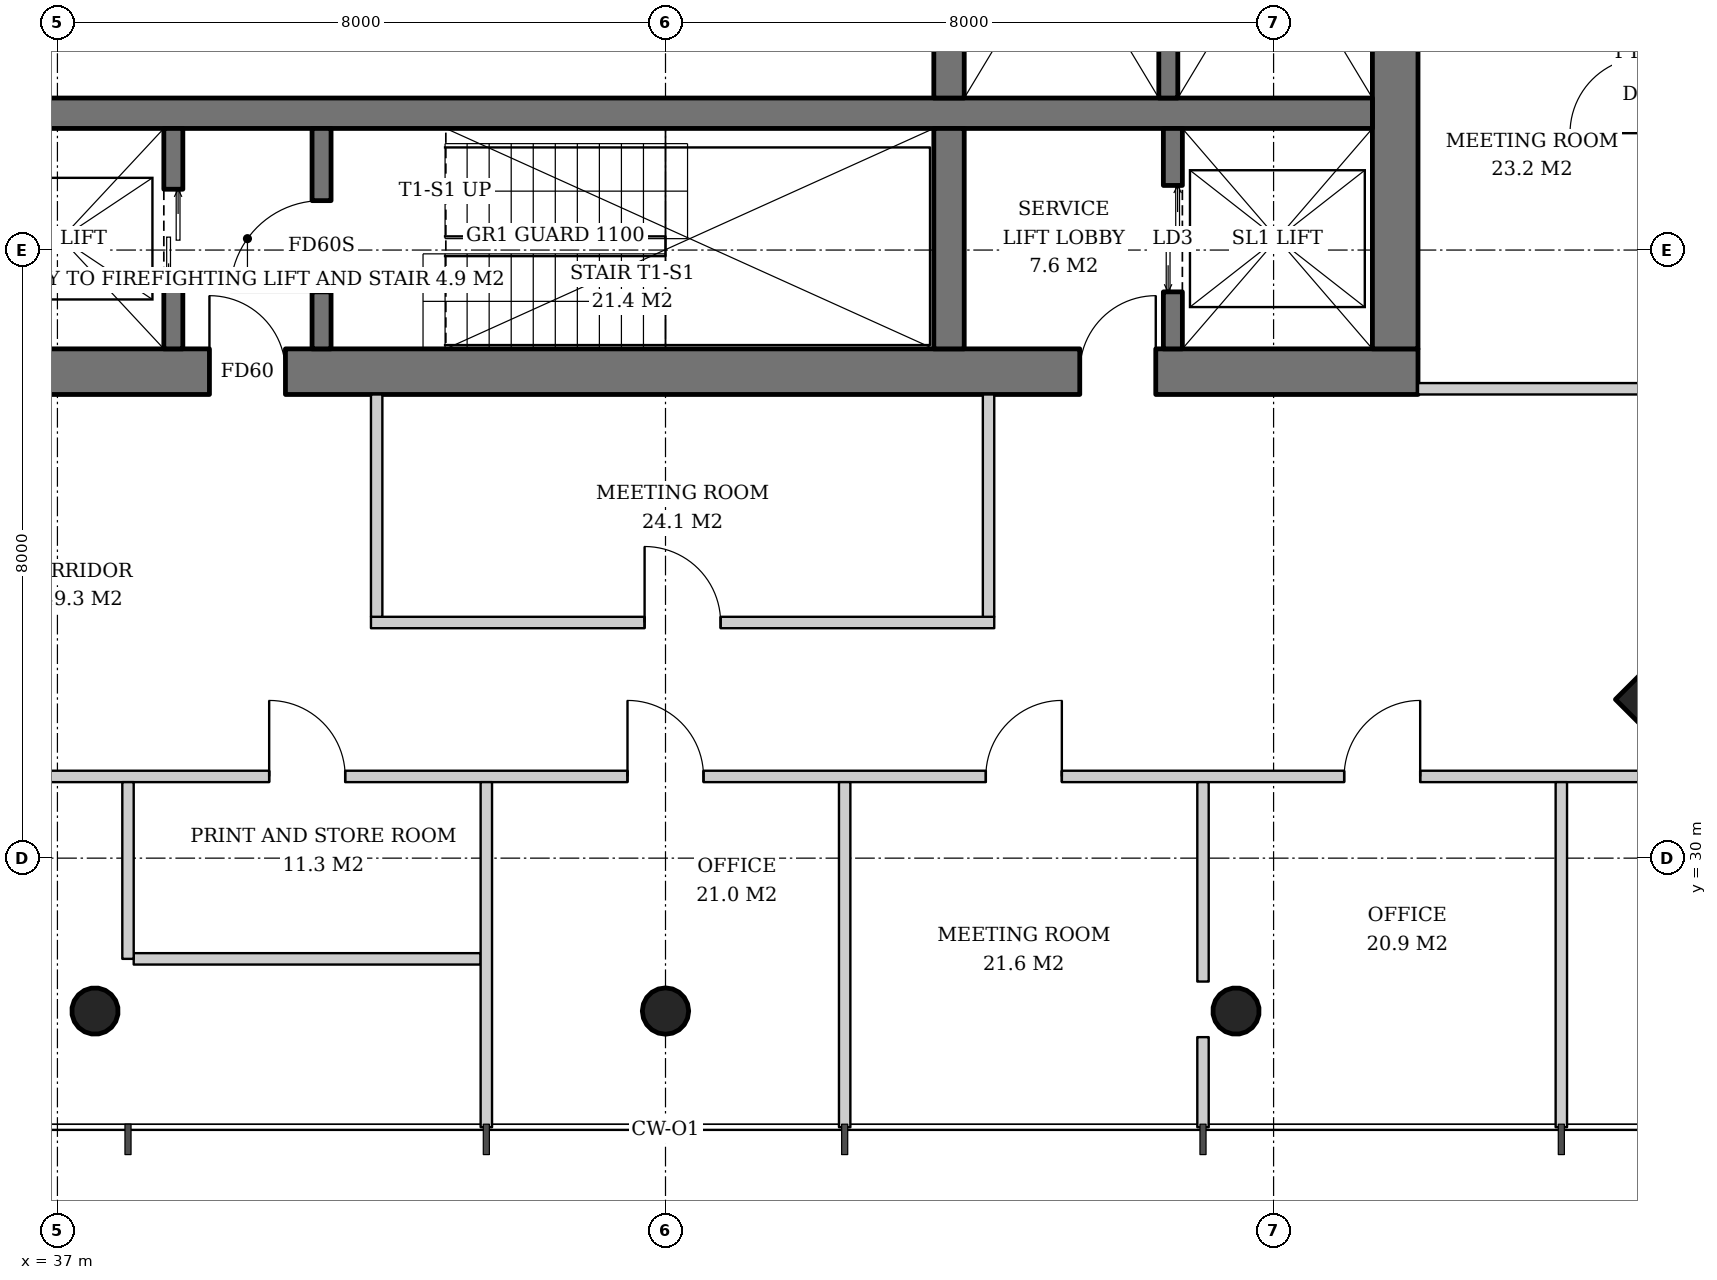
"""IFC4 building model, lengths in metres.
Left out: names, types, materials, properties, quantities, classifications, styles, units other than length and angle.
Written with IfcOpenShell. Run it as: python <this file> out.ifc"""

import sys

from ifc_helpers import new_model, si_unit, direction, frame, frame_2d, origin, origin_2d, place, context, subcontext, project, spatial, rectangle, hollow_circle, extrude, element, fill, save


model = new_model("IFC4")
c1 = context("Model", 3, precision=1e-05, world=origin(), true_north=direction((0.0, 1.0)))
c2 = subcontext(c1, "Body", "Model", "MODEL_VIEW")
j1 = project(units=[si_unit("LENGTHUNIT", "METRE"), si_unit("PLANEANGLEUNIT", "RADIAN")], contexts=[c1])
p1 = place(None, origin())
s1 = spatial("IfcSite", under=j1, at=p1, CompositionType="ELEMENT")
p2 = place(p1, origin())
s2 = spatial("IfcBuilding", under=s1, at=p2, CompositionType="ELEMENT")
p3 = place(p2, frame((0.0, 0.0, 207.2)))
s3 = spatial("IfcBuildingStorey", under=s2, at=p3, CompositionType="ELEMENT", Elevation=207.2)
p4 = place(p3, frame((58.95, 32.05, 0.0), z_axis=(-0.031898107953, 0.031898107953, 0.998981992539), x_axis=(-0.707106781187, -0.707106781187, 0.0)))
e1 = element("IfcColumn", 1, at=p4, inside=s3, PredefinedType="COLUMN", context=c2, shape_type="SweptSolid", body=[
    extrude(rectangle(XDim=2.0, YDim=2.0, at=origin_2d()), origin(), (0.0, 0.0, 1.0), 3.804),
])
p5 = place(p3, frame((37.475, 27.95, 0.0), z_axis=(0.015923015547, 0.031974442509, 0.999361842679), x_axis=(-0.895145027055, 0.445775033553, 0.0)))
e2 = element("IfcColumn", 2, at=p5, inside=s3, PredefinedType="COLUMN", context=c2, shape_type="SweptSolid", body=[
    extrude(hollow_circle(Radius=0.305, WallThickness=0.025, at=origin_2d()), origin(), (0.0, 0.0, 1.0), 3.802),
])
p6 = place(p3, frame((45.0, 27.95, 0.0), z_axis=(0.0, 0.031978496719, 0.999488557087), x_axis=(-1.0, 0.0, 0.0)))
e3 = element("IfcColumn", 3, at=p6, inside=s3, PredefinedType="COLUMN", context=c2, shape_type="SweptSolid", body=[
    extrude(hollow_circle(Radius=0.305, WallThickness=0.025, at=origin_2d()), origin(), (0.0, 0.0, 1.0), 3.802),
])
p7 = place(p3, frame((52.525, 27.95, 0.0), z_axis=(-0.015923015547, 0.031974442509, 0.999361842679), x_axis=(-0.895145027055, -0.445775033553, 0.0)))
e4 = element("IfcColumn", 4, at=p7, inside=s3, PredefinedType="COLUMN", context=c2, shape_type="SweptSolid", body=[
    extrude(hollow_circle(Radius=0.305, WallThickness=0.025, at=origin_2d()), origin(), (0.0, 0.0, 1.0), 3.802),
])
p8 = place(p3, frame((35.1, 36.4, 0.0), z_axis=(0.0, 0.0, 1.0), x_axis=(1.0, 0.0, 0.0)))
e5 = element("IfcWall", 5, at=p8, inside=s3, PredefinedType="SHEAR", context=c2, shape_type="SweptSolid", body=[
    extrude(rectangle(XDim=19.8, YDim=0.6, at=frame_2d((9.9, 0.0))), origin(), (0.0, 0.0, 1.0), 3.8),
])
p9 = place(p8, frame((3.9, 0.0, 0.0)))
e6 = element("IfcOpeningElement", 6, at=p9, cuts=e5, PredefinedType="OPENING", context=c2, shape_type="SweptSolid", body=[
    extrude(rectangle(XDim=1.0, YDim=2.1, at=frame_2d((0.5, 1.05))), frame((0.0, 0.31, 0.0), z_axis=(0.0, -1.0, 0.0), x_axis=(1.0, 0.0, 0.0)), (0.0, 0.0, 1.0), 0.62),
])
p10 = place(p8, frame((15.35, 0.0, 0.0)))
e7 = element("IfcOpeningElement", 7, at=p10, cuts=e5, PredefinedType="OPENING", context=c2, shape_type="SweptSolid", body=[
    extrude(rectangle(XDim=1.0, YDim=2.1, at=frame_2d((0.5, 1.05))), frame((0.0, 0.31, 0.0), z_axis=(0.0, -1.0, 0.0), x_axis=(1.0, 0.0, 0.0)), (0.0, 0.0, 1.0), 0.62),
])
p11 = place(p3, frame((54.6, 36.7, 0.0), z_axis=(0.0, 0.0, 1.0), x_axis=(0.0, 1.0, 0.0)))
e8 = element("IfcWall", 8, at=p11, inside=s3, PredefinedType="SHEAR", context=c2, shape_type="SweptSolid", body=[
    extrude(rectangle(XDim=18.6, YDim=0.6, at=frame_2d((9.3, 0.0))), origin(), (0.0, 0.0, 1.0), 3.8),
])
p12 = place(p11, frame((8.4, 0.0, 0.0)))
e9 = element("IfcOpeningElement", 9, at=p12, cuts=e8, PredefinedType="OPENING", context=c2, shape_type="SweptSolid", body=[
    extrude(rectangle(XDim=1.8, YDim=2.4, at=frame_2d((0.9, 1.2))), frame((0.0, 0.31, 0.0), z_axis=(0.0, -1.0, 0.0), x_axis=(1.0, 0.0, 0.0)), (0.0, 0.0, 1.0), 0.62),
])
p13 = place(p3, frame((35.7, 39.8, 0.0), z_axis=(0.0, 0.0, 1.0), x_axis=(1.0, 0.0, 0.0)))
e10 = element("IfcWall", 10, at=p13, inside=s3, PredefinedType="SHEAR", context=c2, shape_type="SweptSolid", body=[
    extrude(rectangle(XDim=18.6, YDim=0.4, at=frame_2d((9.3, 0.0))), origin(), (0.0, 0.0, 1.0), 3.8),
])
p14 = place(p3, frame((48.73, 36.7, 0.0), z_axis=(0.0, 0.0, 1.0), x_axis=(0.0, 1.0, 0.0)))
e11 = element("IfcWall", 11, at=p14, inside=s3, PredefinedType="SHEAR", context=c2, shape_type="SweptSolid", body=[
    extrude(rectangle(XDim=2.9, YDim=0.4, at=frame_2d((1.45, 0.0))), origin(), (0.0, 0.0, 1.0), 3.8),
])
p15 = place(p3, frame((48.73, 40.0, 0.0), z_axis=(0.0, 0.0, 1.0), x_axis=(0.0, 1.0, 0.0)))
e12 = element("IfcWall", 12, at=p15, inside=s3, PredefinedType="SHEAR", context=c2, shape_type="SweptSolid", body=[
    extrude(rectangle(XDim=12.0, YDim=0.4, at=frame_2d((6.0, 0.0))), origin(), (0.0, 0.0, 1.0), 3.8),
])
p16 = place(p3, frame((38.525, 36.7, 0.0), z_axis=(0.0, 0.0, 1.0), x_axis=(0.0, 1.0, 0.0)))
e13 = element("IfcWall", 13, at=p16, inside=s3, PredefinedType="SHEAR", context=c2, shape_type="SweptSolid", body=[
    extrude(rectangle(XDim=2.9, YDim=0.25, at=frame_2d((1.45, 0.0))), origin(), (0.0, 0.0, 1.0), 3.8),
])
p17 = place(p16, frame((0.8, 0.0, 0.0)))
e14 = element("IfcOpeningElement", 14, at=p17, cuts=e13, PredefinedType="OPENING", context=c2, shape_type="SweptSolid", body=[
    extrude(rectangle(XDim=1.3, YDim=2.2, at=frame_2d((0.65, 1.1))), frame((0.0, 0.135, 0.0), z_axis=(0.0, -1.0, 0.0), x_axis=(1.0, 0.0, 0.0)), (0.0, 0.0, 1.0), 0.27),
])
p18 = place(p3, frame((40.475, 36.7, 0.0), z_axis=(0.0, 0.0, 1.0), x_axis=(0.0, 1.0, 0.0)))
e15 = element("IfcWall", 15, at=p18, inside=s3, PredefinedType="SHEAR", context=c2, shape_type="SweptSolid", body=[
    extrude(rectangle(XDim=2.9, YDim=0.25, at=frame_2d((1.45, 0.0))), origin(), (0.0, 0.0, 1.0), 3.8),
])
p19 = place(p18, frame((0.75, 0.0, 0.0)))
e16 = element("IfcOpeningElement", 16, at=p19, cuts=e15, PredefinedType="OPENING", context=c2, shape_type="SweptSolid", body=[
    extrude(rectangle(XDim=1.2, YDim=2.1, at=frame_2d((0.6, 1.05))), frame((0.0, 0.135, 0.0), z_axis=(0.0, -1.0, 0.0), x_axis=(1.0, 0.0, 0.0)), (0.0, 0.0, 1.0), 0.27),
])
p20 = place(p3, frame((51.675, 36.7, 0.0), z_axis=(0.0, 0.0, 1.0), x_axis=(0.0, 1.0, 0.0)))
e17 = element("IfcWall", 17, at=p20, inside=s3, PredefinedType="SHEAR", context=c2, shape_type="SweptSolid", body=[
    extrude(rectangle(XDim=2.9, YDim=0.25, at=frame_2d((1.45, 0.0))), origin(), (0.0, 0.0, 1.0), 3.8),
])
p21 = place(p20, frame((0.75, 0.0, 0.0)))
e18 = element("IfcOpeningElement", 18, at=p21, cuts=e17, PredefinedType="OPENING", context=c2, shape_type="SweptSolid", body=[
    extrude(rectangle(XDim=1.4, YDim=2.4, at=frame_2d((0.7, 1.2))), frame((0.0, 0.135, 0.0), z_axis=(0.0, -1.0, 0.0), x_axis=(1.0, 0.0, 0.0)), (0.0, 0.0, 1.0), 0.27),
])
p22 = place(p3, frame((51.615, 44.25, 0.0), z_axis=(0.0, 0.0, 1.0), x_axis=(0.0, -1.0, 0.0)))
e19 = element("IfcWall", 19, at=p22, inside=s3, PredefinedType="SHEAR", context=c2, shape_type="SweptSolid", body=[
    extrude(rectangle(XDim=4.25, YDim=0.25, at=frame_2d((2.125, 0.0))), origin(), (0.0, 0.0, 1.0), 3.8),
])
p23 = place(p3, frame((54.9, 36.175, 0.0), z_axis=(0.0, 0.0, 1.0), x_axis=(1.0, 0.0, 0.0)))
e20 = element("IfcWall", 20, at=p23, inside=s3, PredefinedType="PARTITIONING", context=c2, shape_type="SweptSolid", body=[
    extrude(rectangle(XDim=2.925, YDim=0.15, at=frame_2d((1.462, 0.0))), origin(), (0.0, 0.0, 1.0), 2.867),
])
p24 = place(p3, frame((41.125, 33.1, 0.0), z_axis=(0.0, 0.0, 1.0), x_axis=(1.0, 0.0, 0.0)))
e21 = element("IfcWall", 21, at=p24, inside=s3, PredefinedType="PARTITIONING", context=c2, shape_type="SweptSolid", body=[
    extrude(rectangle(XDim=8.2, YDim=0.15, at=frame_2d((4.1, 0.0))), origin(), (0.0, 0.0, 1.0), 2.867),
])
p25 = place(p24, frame((3.6, 0.0, 0.0)))
e22 = element("IfcOpeningElement", 22, at=p25, cuts=e21, PredefinedType="OPENING", context=c2, shape_type="SweptSolid", body=[
    extrude(rectangle(XDim=1.0, YDim=2.1, at=frame_2d((0.5, 1.05))), frame((0.0, 0.085, 0.0), z_axis=(0.0, -1.0, 0.0), x_axis=(1.0, 0.0, 0.0)), (0.0, 0.0, 1.0), 0.17),
])
for number, where, z_axis, x_axis in (
    (23, (41.2, 36.1, 0.0), (0.0, 0.0, 1.0), (0.0, -1.0, 0.0)),
    (24, (49.25, 36.1, 0.0), (0.0, 0.0, 1.0), (0.0, -1.0, 0.0)),
):
    element("IfcWall", number, at=place(p3, frame(where, z_axis=z_axis, x_axis=x_axis)), inside=s3, PredefinedType="PARTITIONING", context=c2, shape_type="SweptSolid", body=[
        extrude(rectangle(XDim=2.925, YDim=0.15, at=frame_2d((1.462, 0.0))), origin(), (0.0, 0.0, 1.0), 3.62),
    ])
p26 = place(p3, frame((38.004, 28.675, 0.0), z_axis=(0.0, 0.0, 1.0), x_axis=(1.0, 0.0, 0.0)))
e25 = element("IfcWall", 25, at=p26, inside=s3, PredefinedType="PARTITIONING", context=c2, shape_type="SweptSolid", body=[
    extrude(rectangle(XDim=4.564, YDim=0.15, at=frame_2d((2.282, 0.0))), origin(), (0.0, 0.0, 1.0), 2.867),
])
p27 = place(p3, frame((31.564, 31.075, 0.0), z_axis=(0.0, 0.0, 1.0), x_axis=(1.0, 0.0, 0.0)))
e26 = element("IfcWall", 26, at=p27, inside=s3, PredefinedType="PARTITIONING", context=c2, shape_type="SweptSolid", body=[
    extrude(rectangle(XDim=26.872, YDim=0.15, at=frame_2d((13.436, 0.0))), origin(), (0.0, 0.0, 1.0), 2.867),
])
p28 = place(p27, frame((3.507, 0.0, 0.0)))
e27 = element("IfcOpeningElement", 27, at=p28, cuts=e26, PredefinedType="OPENING", context=c2, shape_type="SweptSolid", body=[
    extrude(rectangle(XDim=1.0, YDim=2.1, at=frame_2d((0.5, 1.05))), frame((0.0, 0.085, 0.0), z_axis=(0.0, -1.0, 0.0), x_axis=(1.0, 0.0, 0.0)), (0.0, 0.0, 1.0), 0.17),
])
p29 = place(p27, frame((8.221, 0.0, 0.0)))
e28 = element("IfcOpeningElement", 28, at=p29, cuts=e26, PredefinedType="OPENING", context=c2, shape_type="SweptSolid", body=[
    extrude(rectangle(XDim=1.0, YDim=2.1, at=frame_2d((0.5, 1.05))), frame((0.0, 0.085, 0.0), z_axis=(0.0, -1.0, 0.0), x_axis=(1.0, 0.0, 0.0)), (0.0, 0.0, 1.0), 0.17),
])
p30 = place(p27, frame((12.936, 0.0, 0.0)))
e29 = element("IfcOpeningElement", 29, at=p30, cuts=e26, PredefinedType="OPENING", context=c2, shape_type="SweptSolid", body=[
    extrude(rectangle(XDim=1.0, YDim=2.1, at=frame_2d((0.5, 1.05))), frame((0.0, 0.085, 0.0), z_axis=(0.0, -1.0, 0.0), x_axis=(1.0, 0.0, 0.0)), (0.0, 0.0, 1.0), 0.17),
])
p31 = place(p27, frame((17.65, 0.0, 0.0)))
e30 = element("IfcOpeningElement", 30, at=p31, cuts=e26, PredefinedType="OPENING", context=c2, shape_type="SweptSolid", body=[
    extrude(rectangle(XDim=1.0, YDim=2.1, at=frame_2d((0.5, 1.05))), frame((0.0, 0.085, 0.0), z_axis=(0.0, -1.0, 0.0), x_axis=(1.0, 0.0, 0.0)), (0.0, 0.0, 1.0), 0.17),
])
p32 = place(p27, frame((22.364, 0.0, 0.0)))
e31 = element("IfcOpeningElement", 31, at=p32, cuts=e26, PredefinedType="OPENING", context=c2, shape_type="SweptSolid", body=[
    extrude(rectangle(XDim=1.0, YDim=2.1, at=frame_2d((0.5, 1.05))), frame((0.0, 0.085, 0.0), z_axis=(0.0, -1.0, 0.0), x_axis=(1.0, 0.0, 0.0)), (0.0, 0.0, 1.0), 0.17),
])
p33 = place(p3, frame((37.928, 31.0, 0.0), z_axis=(0.0, 0.0, 1.0), x_axis=(0.0, -1.0, 0.0)))
e32 = element("IfcWall", 32, at=p33, inside=s3, PredefinedType="PARTITIONING", context=c2, shape_type="SweptSolid", body=[
    extrude(rectangle(XDim=2.325, YDim=0.15, at=frame_2d((1.163, 0.0))), origin(), (0.0, 0.0, 1.0), 3.62),
])
p34 = place(p3, frame((42.643, 31.0, 0.0), z_axis=(0.0, 0.0, 1.0), x_axis=(0.0, -1.0, 0.0)))
e33 = element("IfcWall", 33, at=p34, inside=s3, PredefinedType="PARTITIONING", context=c2, shape_type="SweptSolid", body=[
    extrude(rectangle(XDim=4.54, YDim=0.15, at=frame_2d((2.27, 0.0))), origin(), (0.0, 0.0, 1.0), 3.12),
])
p35 = place(p3, frame((47.357, 31.0, 0.0), z_axis=(0.0, 0.0, 1.0), x_axis=(0.0, -1.0, 0.0)))
e34 = element("IfcWall", 34, at=p35, inside=s3, PredefinedType="PARTITIONING", context=c2, shape_type="SweptSolid", body=[
    extrude(rectangle(XDim=4.54, YDim=0.15, at=frame_2d((2.27, 0.0))), origin(), (0.0, 0.0, 1.0), 2.867),
])
p36 = place(p3, frame((52.072, 31.0, 0.0), z_axis=(0.0, 0.0, 1.0), x_axis=(0.0, -1.0, 0.0)))
e35 = element("IfcWall", 35, at=p36, inside=s3, PredefinedType="PARTITIONING", context=c2, shape_type="SweptSolid", body=[
    extrude(rectangle(XDim=2.624, YDim=0.15, at=frame_2d((1.312, 0.0))), origin(), (0.0, 0.0, 1.0), 3.62),
])
p37 = place(p3, frame((52.072, 27.645, 0.0), z_axis=(0.0, 0.0, 1.0), x_axis=(0.0, -1.0, 0.0)))
e36 = element("IfcWall", 36, at=p37, inside=s3, PredefinedType="PARTITIONING", context=c2, shape_type="SweptSolid", body=[
    extrude(rectangle(XDim=1.185, YDim=0.15, at=frame_2d((0.593, 0.0))), origin(), (0.0, 0.0, 1.0), 3.62),
])
p38 = place(p3, frame((56.786, 31.0, 0.0), z_axis=(0.0, 0.0, 1.0), x_axis=(0.0, -1.0, 0.0)))
e37 = element("IfcWall", 37, at=p38, inside=s3, PredefinedType="PARTITIONING", context=c2, shape_type="SweptSolid", body=[
    extrude(rectangle(XDim=4.54, YDim=0.15, at=frame_2d((2.27, 0.0))), origin(), (0.0, 0.0, 1.0), 3.12),
])
p39 = place(p17, origin())
e38 = element("IfcDoor", 38, at=p39, inside=s3, OperationType="DOUBLE_DOOR_SLIDING", PredefinedType="DOOR", context=c2, shape_type="SweptSolid", body=[
    extrude(rectangle(XDim=1.3, YDim=2.2, at=frame_2d((0.65, 1.1))), frame((0.0, 0.025, 0.0), z_axis=(0.0, -1.0, 0.0), x_axis=(1.0, 0.0, 0.0)), (0.0, 0.0, 1.0), 0.05),
])
fill(e14, e38)
p40 = place(p19, origin())
e39 = element("IfcDoor", 39, at=p40, inside=s3, OperationType="SINGLE_SWING_LEFT", PredefinedType="DOOR", context=c2, shape_type="SweptSolid", body=[
    extrude(rectangle(XDim=1.2, YDim=2.1, at=frame_2d((0.6, 1.05))), frame((0.0, 0.025, 0.0), z_axis=(0.0, -1.0, 0.0), x_axis=(1.0, 0.0, 0.0)), (0.0, 0.0, 1.0), 0.05),
])
fill(e16, e39)
p41 = place(p21, origin())
e40 = element("IfcDoor", 40, at=p41, inside=s3, OperationType="DOUBLE_DOOR_SLIDING", PredefinedType="DOOR", context=c2, shape_type="SweptSolid", body=[
    extrude(rectangle(XDim=1.4, YDim=2.4, at=frame_2d((0.7, 1.2))), frame((0.0, 0.025, 0.0), z_axis=(0.0, -1.0, 0.0), x_axis=(1.0, 0.0, 0.0)), (0.0, 0.0, 1.0), 0.05),
])
fill(e18, e40)
p42 = place(p9, origin())
e41 = element("IfcDoor", 41, at=p42, inside=s3, OperationType="SINGLE_SWING_LEFT", PredefinedType="DOOR", context=c2, shape_type="SweptSolid", body=[
    extrude(rectangle(XDim=1.0, YDim=2.1, at=frame_2d((0.5, 1.05))), frame((0.0, 0.025, 0.0), z_axis=(0.0, -1.0, 0.0), x_axis=(1.0, 0.0, 0.0)), (0.0, 0.0, 1.0), 0.05),
])
fill(e6, e41)
p43 = place(p10, origin())
e42 = element("IfcDoor", 42, at=p43, inside=s3, OperationType="SINGLE_SWING_RIGHT", PredefinedType="DOOR", context=c2, shape_type="SweptSolid", body=[
    extrude(rectangle(XDim=1.0, YDim=2.1, at=frame_2d((0.5, 1.05))), frame((0.0, 0.025, 0.0), z_axis=(0.0, -1.0, 0.0), x_axis=(1.0, 0.0, 0.0)), (0.0, 0.0, 1.0), 0.05),
])
fill(e7, e42)
p44 = place(p25, origin())
e43 = element("IfcDoor", 43, at=p44, inside=s3, OperationType="SINGLE_SWING_LEFT", PredefinedType="DOOR", context=c2, shape_type="SweptSolid", body=[
    extrude(rectangle(XDim=1.0, YDim=2.1, at=frame_2d((0.5, 1.05))), frame((0.0, 0.025, 0.0), z_axis=(0.0, -1.0, 0.0), x_axis=(1.0, 0.0, 0.0)), (0.0, 0.0, 1.0), 0.05),
])
fill(e22, e43)
p45 = place(p29, origin())
e44 = element("IfcDoor", 44, at=p45, inside=s3, OperationType="SINGLE_SWING_LEFT", PredefinedType="DOOR", context=c2, shape_type="SweptSolid", body=[
    extrude(rectangle(XDim=1.0, YDim=2.1, at=frame_2d((0.5, 1.05))), frame((0.0, 0.025, 0.0), z_axis=(0.0, -1.0, 0.0), x_axis=(1.0, 0.0, 0.0)), (0.0, 0.0, 1.0), 0.05),
])
fill(e28, e44)
p46 = place(p30, origin())
e45 = element("IfcDoor", 45, at=p46, inside=s3, OperationType="SINGLE_SWING_LEFT", PredefinedType="DOOR", context=c2, shape_type="SweptSolid", body=[
    extrude(rectangle(XDim=1.0, YDim=2.1, at=frame_2d((0.5, 1.05))), frame((0.0, 0.025, 0.0), z_axis=(0.0, -1.0, 0.0), x_axis=(1.0, 0.0, 0.0)), (0.0, 0.0, 1.0), 0.05),
])
fill(e29, e45)
p47 = place(p31, origin())
e46 = element("IfcDoor", 46, at=p47, inside=s3, OperationType="SINGLE_SWING_RIGHT", PredefinedType="DOOR", context=c2, shape_type="SweptSolid", body=[
    extrude(rectangle(XDim=1.0, YDim=2.1, at=frame_2d((0.5, 1.05))), frame((0.0, 0.025, 0.0), z_axis=(0.0, -1.0, 0.0), x_axis=(1.0, 0.0, 0.0)), (0.0, 0.0, 1.0), 0.05),
])
fill(e30, e46)
p48 = place(p32, origin())
e47 = element("IfcDoor", 47, at=p48, inside=s3, OperationType="SINGLE_SWING_RIGHT", PredefinedType="DOOR", context=c2, shape_type="SweptSolid", body=[
    extrude(rectangle(XDim=1.0, YDim=2.1, at=frame_2d((0.5, 1.05))), frame((0.0, 0.025, 0.0), z_axis=(0.0, -1.0, 0.0), x_axis=(1.0, 0.0, 0.0)), (0.0, 0.0, 1.0), 0.05),
])
fill(e31, e47)
save(model, sys.argv[1])
